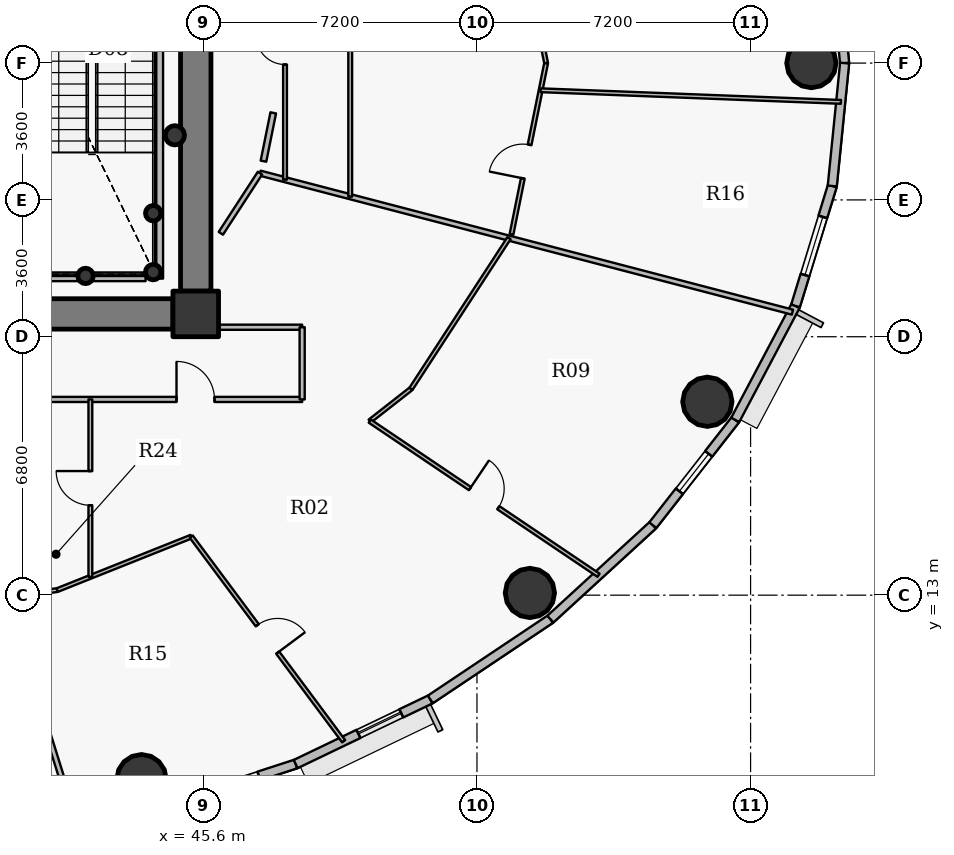
"""IFC4 building model, lengths in metres.
Left out: names, types, materials, properties, quantities, classifications, styles, units other than length and angle.
Written with IfcOpenShell. Run it as: python <this file> out.ifc"""

import sys

from ifc_helpers import new_model, si_unit, direction, frame, frame_2d, origin, origin_2d, place, context, subcontext, project, spatial, rectangle, hollow_circle, extrude, source, transform, mapped, element, fill, save


model = new_model("IFC4")
c1 = context("Model", 3, precision=1e-05, world=origin(), true_north=direction((0.0, 1.0)))
c2 = subcontext(c1, "Body", "Model", "MODEL_VIEW")
j1 = project(units=[si_unit("LENGTHUNIT", "METRE"), si_unit("PLANEANGLEUNIT", "RADIAN")], contexts=[c1])
p1 = place(None, origin())
s1 = spatial("IfcSite", under=j1, at=p1, CompositionType="ELEMENT")
p2 = place(p1, origin())
s2 = spatial("IfcBuilding", under=s1, at=p2, CompositionType="ELEMENT")
p3 = place(p2, frame((0.0, 0.0, 178.65)))
s3 = spatial("IfcBuildingStorey", under=s2, at=p3, CompositionType="ELEMENT", Elevation=178.65)
p4 = place(p3, frame((45.4, 20.4, 0.0), z_axis=(0.0, 0.0, 1.0), x_axis=(1.0, 0.0, 0.0)))
e1 = element("IfcColumn", 1, at=p4, inside=s3, PredefinedType="COLUMN", context=c2, shape_type="SweptSolid", body=[
    extrude(rectangle(XDim=1.2, YDim=1.2, at=origin_2d()), origin(), (0.0, 0.0, 1.0), 3.75),
])
for number, where, z_axis, x_axis in (
    (2, (44.28, 21.5, 0.0), (0.0, 0.0, 1.0), (1.0, 0.0, 0.0)),
    (3, (44.28, 23.05, 0.0), (0.0, 0.0, 1.0), (1.0, 0.0, 0.0)),
    (4, (42.5, 21.4, 0.0), (0.0, 0.0, 1.0), (1.0, 0.0, 0.0)),
):
    element("IfcColumn", number, at=place(p3, frame(where, z_axis=z_axis, x_axis=x_axis)), inside=s3, PredefinedType="COLUMN", context=c2, shape_type="SweptSolid", body=[
        extrude(hollow_circle(Radius=0.203, WallThickness=0.016, at=origin_2d()), origin(), (0.0, 0.0, 1.0), 3.75),
    ])
p5 = place(p3, frame((45.4, 33.0, 0.0), z_axis=(0.0, 0.0, 1.0), x_axis=(0.0, -1.0, 0.0)))
e5 = element("IfcWall", 5, at=p5, inside=s3, PredefinedType="SHEAR", context=c2, shape_type="SweptSolid", body=[
    extrude(rectangle(XDim=12.0, YDim=0.8, at=frame_2d((6.0, 0.0))), origin(), (0.0, 0.0, 1.0), 2.95),
])
p6 = place(p3, frame((44.8, 20.4, 0.0), z_axis=(0.0, 0.0, 1.0), x_axis=(-1.0, 0.0, 0.0)))
e6 = element("IfcWall", 6, at=p6, inside=s3, PredefinedType="SHEAR", context=c2, shape_type="SweptSolid", body=[
    extrude(rectangle(XDim=17.6, YDim=0.8, at=frame_2d((8.8, 0.0))), origin(), (0.0, 0.0, 1.0), 2.95),
])
p7 = place(p6, frame((9.55, 0.0, 0.0)))
e7 = element("IfcOpeningElement", 7, at=p7, cuts=e6, PredefinedType="OPENING", context=c2, shape_type="SweptSolid", body=[
    extrude(rectangle(XDim=1.15, YDim=2.15, at=origin_2d()), frame((0.575, 0.41, 1.075), z_axis=(0.0, -1.0, 0.0), x_axis=(1.0, 0.0, 0.0)), (0.0, 0.0, 1.0), 0.82),
])
for number, where, z_axis, x_axis in (
    (8, (61.6, 27.0, 0.0), (0.0, 0.0, 1.0), (1.0, 0.0, 0.0)),
    (9, (43.973, 8.159, 0.0), (0.0, 0.0, 1.0), (1.0, 0.0, 0.0)),
    (10, (54.192, 13.058, 0.0), (0.0, 0.0, 1.0), (1.0, 0.0, 0.0)),
    (11, (58.863, 18.089, 0.0), (0.0, 0.0, 1.0), (1.0, 0.0, 0.0)),
):
    element("IfcColumn", number, at=place(p3, frame(where, z_axis=z_axis, x_axis=x_axis)), inside=s3, PredefinedType="COLUMN", context=c2, shape_type="SweptSolid", body=[
        extrude(hollow_circle(Radius=0.65, WallThickness=0.04, at=origin_2d()), origin(), (0.0, 0.0, 1.0), 3.75),
    ])
p8 = place(p3, frame((44.85, 25.1, 0.0), z_axis=(0.0, 0.0, 1.0), x_axis=(1.0, 0.0, 0.0)))
e12 = element("IfcColumn", 12, at=p8, inside=s3, PredefinedType="COLUMN", context=c2, shape_type="SweptSolid", body=[
    extrude(hollow_circle(Radius=0.254, WallThickness=0.02, at=origin_2d()), origin(), (0.0, 0.0, 1.0), 3.75),
])
p9 = place(p3, frame((62.15, 30.234, 0.0), z_axis=(0.0, 0.0, 1.0), x_axis=(0.100061534614, -0.994981250723, 0.0)))
e13 = element("IfcWall", 13, at=p9, inside=s3, PredefinedType="SOLIDWALL", context=c2, shape_type="SweptSolid", body=[
    extrude(rectangle(XDim=3.25, YDim=0.24, at=frame_2d((1.625, 0.0))), origin(), (0.0, 0.0, 1.0), 3.5),
])
p10 = place(p3, frame((48.03, 8.556, 0.0), z_axis=(0.0, 0.0, 1.0), x_axis=(-0.951209870236, -0.30854462038, 0.0)))
e14 = element("IfcWall", 14, at=p10, inside=s3, PredefinedType="SOLIDWALL", context=c2, shape_type="SweptSolid", body=[
    extrude(rectangle(XDim=4.038, YDim=0.24, at=frame_2d((2.019, 0.0))), origin(), (0.0, 0.0, 1.0), 3.5),
])
p11 = place(p10, frame((1.019, 0.0, 0.9)))
e15 = element("IfcOpeningElement", 15, at=p11, cuts=e14, PredefinedType="OPENING", context=c2, shape_type="SweptSolid", body=[
    extrude(rectangle(XDim=2.0, YDim=1.75, at=origin_2d()), frame((1.0, 0.13, 0.875), z_axis=(0.0, -1.0, 0.0), x_axis=(1.0, 0.0, 0.0)), (0.0, 0.0, 1.0), 0.26),
])
p12 = place(p3, frame((51.573, 10.257, 0.0), z_axis=(0.0, 0.0, 1.0), x_axis=(-0.901564733809, -0.432644231155, 0.0)))
e16 = element("IfcWall", 16, at=p12, inside=s3, PredefinedType="SOLIDWALL", context=c2, shape_type="SweptSolid", body=[
    extrude(rectangle(XDim=3.93, YDim=0.24, at=frame_2d((1.965, 0.0))), origin(), (0.0, 0.0, 1.0), 3.5),
])
p13 = place(p12, frame((0.848, 0.0, 0.9)))
e17 = element("IfcOpeningElement", 17, at=p13, cuts=e16, PredefinedType="OPENING", context=c2, shape_type="SweptSolid", body=[
    extrude(rectangle(XDim=1.25, YDim=1.65, at=origin_2d()), frame((0.625, 0.13, 0.825), z_axis=(0.0, -1.0, 0.0), x_axis=(1.0, 0.0, 0.0)), (0.0, 0.0, 1.0), 0.26),
])
p14 = place(p3, frame((54.732, 12.369, 0.0), z_axis=(0.0, 0.0, 1.0), x_axis=(-0.831228998277, -0.555930168657, 0.0)))
e18 = element("IfcWall", 18, at=p14, inside=s3, PredefinedType="SOLIDWALL", context=c2, shape_type="SweptSolid", body=[
    extrude(rectangle(XDim=3.8, YDim=0.24, at=frame_2d((1.9, 0.0))), origin(), (0.0, 0.0, 1.0), 3.5),
])
p15 = place(p3, frame((57.428, 14.842, 0.0), z_axis=(0.0, 0.0, 1.0), x_axis=(-0.737076565834, -0.675809245349, 0.0)))
e19 = element("IfcWall", 19, at=p15, inside=s3, PredefinedType="SOLIDWALL", context=c2, shape_type="SweptSolid", body=[
    extrude(rectangle(XDim=3.658, YDim=0.24, at=frame_2d((1.829, 0.0))), origin(), (0.0, 0.0, 1.0), 3.5),
])
p16 = place(p3, frame((59.596, 17.612, 0.0), z_axis=(0.0, 0.0, 1.0), x_axis=(-0.616287674549, -0.787521112224, 0.0)))
e20 = element("IfcWall", 20, at=p16, inside=s3, PredefinedType="SOLIDWALL", context=c2, shape_type="SweptSolid", body=[
    extrude(rectangle(XDim=3.517, YDim=0.24, at=frame_2d((1.759, 0.0))), origin(), (0.0, 0.0, 1.0), 3.5),
])
p17 = place(p16, frame((1.134, 0.0, 0.9)))
e21 = element("IfcOpeningElement", 21, at=p17, cuts=e20, PredefinedType="OPENING", context=c2, shape_type="SweptSolid", body=[
    extrude(rectangle(XDim=1.25, YDim=1.65, at=origin_2d()), frame((0.625, 0.13, 0.825), z_axis=(0.0, -1.0, 0.0), x_axis=(1.0, 0.0, 0.0)), (0.0, 0.0, 1.0), 0.26),
])
p18 = place(p3, frame((61.183, 20.611, 0.0), z_axis=(0.0, 0.0, 1.0), x_axis=(-0.467586874938, -0.88394712194, 0.0)))
e22 = element("IfcWall", 22, at=p18, inside=s3, PredefinedType="SOLIDWALL", context=c2, shape_type="SweptSolid", body=[
    extrude(rectangle(XDim=3.393, YDim=0.24, at=frame_2d((1.697, 0.0))), origin(), (0.0, 0.0, 1.0), 3.5),
])
p19 = place(p3, frame((62.15, 23.766, 0.0), z_axis=(0.0, 0.0, 1.0), x_axis=(-0.293097995113, -0.956082405058, 0.0)))
e23 = element("IfcWall", 23, at=p19, inside=s3, PredefinedType="SOLIDWALL", context=c2, shape_type="SweptSolid", body=[
    extrude(rectangle(XDim=3.3, YDim=0.24, at=frame_2d((1.65, 0.0))), origin(), (0.0, 0.0, 1.0), 3.5),
])
p20 = place(p19, frame((0.85, 0.0, 0.9)))
e24 = element("IfcOpeningElement", 24, at=p20, cuts=e23, PredefinedType="OPENING", context=c2, shape_type="SweptSolid", body=[
    extrude(rectangle(XDim=1.6, YDim=1.75, at=origin_2d()), frame((0.8, 0.13, 0.875), z_axis=(0.0, -1.0, 0.0), x_axis=(1.0, 0.0, 0.0)), (0.0, 0.0, 1.0), 0.26),
])
p21 = place(p3, frame((62.475, 27.0, 0.0), z_axis=(0.0, 0.0, 1.0), x_axis=(-0.100061534614, -0.994981250723, 0.0)))
e25 = element("IfcWall", 25, at=p21, inside=s3, PredefinedType="SOLIDWALL", context=c2, shape_type="SweptSolid", body=[
    extrude(rectangle(XDim=3.25, YDim=0.24, at=frame_2d((1.625, 0.0))), origin(), (0.0, 0.0, 1.0), 3.5),
])
p22 = place(p3, frame((36.0, 12.419, 0.0), z_axis=(0.0, 0.0, 1.0), x_axis=(0.992396615981, 0.123081097612, 0.0)))
e26 = element("IfcWall", 26, at=p22, inside=s3, PredefinedType="PARTITIONING", context=c2, shape_type="SweptSolid", body=[
    extrude(rectangle(XDim=5.798, YDim=0.1, at=frame_2d((2.899, 0.0))), origin(), (0.0, 0.0, 1.0), 2.935),
])
p23 = place(p3, frame((38.764, 18.15, 0.0), z_axis=(0.0, 0.0, 1.0), x_axis=(0.298084348379, -0.954539533624, 0.0)))
e27 = element("IfcWall", 27, at=p23, inside=s3, PredefinedType="PARTITIONING", context=c2, shape_type="SweptSolid", body=[
    extrude(rectangle(XDim=11.74, YDim=0.135, at=frame_2d((5.87, 0.0))), origin(), (0.0, 0.0, 1.0), 2.935),
])
p24 = place(p3, frame((38.764, 18.15, 0.0), z_axis=(0.0, 0.0, 1.0), x_axis=(1.0, 0.0, 0.0)))
e28 = element("IfcWall", 28, at=p24, inside=s3, PredefinedType="PARTITIONING", context=c2, shape_type="SweptSolid", body=[
    extrude(rectangle(XDim=9.436, YDim=0.135, at=frame_2d((4.718, 0.0))), origin(), (0.0, 0.0, 1.0), 2.935),
])
p25 = place(p24, frame((6.13, 0.0, 0.0)))
e29 = element("IfcOpeningElement", 29, at=p25, cuts=e28, PredefinedType="OPENING", context=c2, shape_type="SweptSolid", body=[
    extrude(rectangle(XDim=1.0, YDim=2.15, at=origin_2d()), frame((0.5, 0.078, 1.075), z_axis=(0.0, -1.0, 0.0), x_axis=(1.0, 0.0, 0.0)), (0.0, 0.0, 1.0), 0.155),
])
p26 = place(p3, frame((41.754, 13.133, 0.0), z_axis=(0.0, 0.0, 1.0), x_axis=(0.928786664236, 0.370614803182, 0.0)))
e30 = element("IfcWall", 30, at=p26, inside=s3, PredefinedType="PARTITIONING", context=c2, shape_type="SweptSolid", body=[
    extrude(rectangle(XDim=3.798, YDim=0.1, at=frame_2d((1.899, 0.0))), origin(), (0.0, 0.0, 1.0), 2.935),
])
p27 = place(p3, frame((42.627, 13.481, 0.0), z_axis=(0.0, 0.0, 1.0), x_axis=(0.0, 1.0, 0.0)))
e31 = element("IfcWall", 31, at=p27, inside=s3, PredefinedType="PARTITIONING", context=c2, shape_type="SweptSolid", body=[
    extrude(rectangle(XDim=4.669, YDim=0.1, at=frame_2d((2.334, 0.0))), origin(), (0.0, 0.0, 1.0), 3.5),
])
p28 = place(p27, frame((1.885, 0.0, 0.0)))
e32 = element("IfcOpeningElement", 32, at=p28, cuts=e31, PredefinedType="OPENING", context=c2, shape_type="SweptSolid", body=[
    extrude(rectangle(XDim=0.9, YDim=2.1, at=origin_2d()), frame((0.45, 0.06, 1.05), z_axis=(0.0, -1.0, 0.0), x_axis=(1.0, 0.0, 0.0)), (0.0, 0.0, 1.0), 0.12),
])
p29 = place(p3, frame((44.44, 21.33, 0.0), z_axis=(0.0, 0.0, 1.0), x_axis=(0.0, 1.0, 0.0)))
e33 = element("IfcWall", 33, at=p29, inside=s3, PredefinedType="PARTITIONING", context=c2, shape_type="SweptSolid", body=[
    extrude(rectangle(XDim=8.52, YDim=0.2, at=frame_2d((4.26, 0.0))), origin(), (0.0, 0.0, 1.0), 3.5),
])
p30 = place(p3, frame((45.282, 14.54, 0.0), z_axis=(0.0, 0.0, 1.0), x_axis=(0.597407497301, -0.801937829366, 0.0)))
e34 = element("IfcWall", 34, at=p30, inside=s3, PredefinedType="PARTITIONING", context=c2, shape_type="SweptSolid", body=[
    extrude(rectangle(XDim=6.713, YDim=0.1, at=frame_2d((3.356, 0.0))), origin(), (0.0, 0.0, 1.0), 2.935),
])
p31 = place(p30, frame((2.906, 0.0, 0.0)))
e35 = element("IfcOpeningElement", 35, at=p31, cuts=e34, PredefinedType="OPENING", context=c2, shape_type="SweptSolid", body=[
    extrude(rectangle(XDim=0.9, YDim=2.1, at=origin_2d()), frame((0.45, 0.06, 1.05), z_axis=(0.0, -1.0, 0.0), x_axis=(1.0, 0.0, 0.0)), (0.0, 0.0, 1.0), 0.12),
])
p32 = place(p3, frame((45.8, 20.05, 0.0), z_axis=(0.0, 0.0, 1.0), x_axis=(1.0, 0.0, 0.0)))
e36 = element("IfcWall", 36, at=p32, inside=s3, PredefinedType="PARTITIONING", context=c2, shape_type="SweptSolid", body=[
    extrude(rectangle(XDim=2.4, YDim=0.135, at=frame_2d((1.2, 0.0))), origin(), (0.0, 0.0, 1.0), 3.5),
])
p33 = place(p3, frame((47.09, 24.105, 0.0), z_axis=(0.0, 0.0, 1.0), x_axis=(0.967573213792, -0.252590728159, 0.0)))
e37 = element("IfcWall", 37, at=p33, inside=s3, PredefinedType="PARTITIONING", context=c2, shape_type="SweptSolid", body=[
    extrude(rectangle(XDim=14.481, YDim=0.135, at=frame_2d((7.24, 0.0))), origin(), (0.0, 0.0, 1.0), 2.935),
])
p34 = place(p3, frame((47.749, 23.933, 0.0), z_axis=(0.0, 0.0, 1.0), x_axis=(0.0, 1.0, 0.0)))
e38 = element("IfcWall", 38, at=p34, inside=s3, PredefinedType="PARTITIONING", context=c2, shape_type="SweptSolid", body=[
    extrude(rectangle(XDim=9.314, YDim=0.1, at=frame_2d((4.657, 0.0))), origin(), (0.0, 0.0, 1.0), 2.935),
])
p35 = place(p34, frame((3.03, 0.0, 0.0)))
e39 = element("IfcOpeningElement", 39, at=p35, cuts=e38, PredefinedType="OPENING", context=c2, shape_type="SweptSolid", body=[
    extrude(rectangle(XDim=0.76, YDim=2.1, at=origin_2d()), frame((0.38, 0.06, 1.05), z_axis=(0.0, -1.0, 0.0), x_axis=(1.0, 0.0, 0.0)), (0.0, 0.0, 1.0), 0.12),
])
p36 = place(p3, frame((48.2, 18.15, 0.0), z_axis=(0.0, 0.0, 1.0), x_axis=(0.0, 1.0, 0.0)))
e40 = element("IfcWall", 40, at=p36, inside=s3, PredefinedType="PARTITIONING", context=c2, shape_type="SweptSolid", body=[
    extrude(rectangle(XDim=1.9, YDim=0.135, at=frame_2d((0.95, 0.0))), origin(), (0.0, 0.0, 1.0), 3.5),
])
p37 = place(p3, frame((49.464, 23.485, 0.0), z_axis=(0.0, 0.0, 1.0), x_axis=(0.0, 1.0, 0.0)))
e41 = element("IfcWall", 41, at=p37, inside=s3, PredefinedType="PARTITIONING", context=c2, shape_type="SweptSolid", body=[
    extrude(rectangle(XDim=10.465, YDim=0.1, at=frame_2d((5.232, 0.0))), origin(), (0.0, 0.0, 1.0), 2.935),
])
p38 = place(p37, frame((4.783, 0.0, 0.0)))
e42 = element("IfcOpeningElement", 42, at=p38, cuts=e41, PredefinedType="OPENING", context=c2, shape_type="SweptSolid", body=[
    extrude(rectangle(XDim=0.9, YDim=2.1, at=origin_2d()), frame((0.45, 0.06, 1.05), z_axis=(0.0, -1.0, 0.0), x_axis=(1.0, 0.0, 0.0)), (0.0, 0.0, 1.0), 0.12),
])
p39 = place(p3, frame((49.979, 17.58, 0.0), z_axis=(0.0, 0.0, 1.0), x_axis=(0.787344176355, 0.6165137046, 0.0)))
e43 = element("IfcWall", 43, at=p39, inside=s3, PredefinedType="PARTITIONING", context=c2, shape_type="SweptSolid", body=[
    extrude(rectangle(XDim=1.378, YDim=0.1, at=frame_2d((0.689, 0.0))), origin(), (0.0, 0.0, 1.0), 3.5),
])
p40 = place(p3, frame((49.979, 17.58, 0.0), z_axis=(0.0, 0.0, 1.0), x_axis=(0.829313188428, -0.55878406876, 0.0)))
e44 = element("IfcWall", 44, at=p40, inside=s3, PredefinedType="PARTITIONING", context=c2, shape_type="SweptSolid", body=[
    extrude(rectangle(XDim=7.259, YDim=0.1, at=frame_2d((3.629, 0.0))), origin(), (0.0, 0.0, 1.0), 2.935),
])
p41 = place(p40, frame((3.179, 0.0, 0.0)))
e45 = element("IfcOpeningElement", 45, at=p41, cuts=e44, PredefinedType="OPENING", context=c2, shape_type="SweptSolid", body=[
    extrude(rectangle(XDim=0.9, YDim=2.1, at=origin_2d()), frame((0.45, 0.06, 1.05), z_axis=(0.0, -1.0, 0.0), x_axis=(1.0, 0.0, 0.0)), (0.0, 0.0, 1.0), 0.12),
])
p42 = place(p3, frame((51.064, 18.429, 0.0), z_axis=(0.0, 0.0, 1.0), x_axis=(0.545362062942, 0.838200584767, 0.0)))
e46 = element("IfcWall", 46, at=p42, inside=s3, PredefinedType="PARTITIONING", context=c2, shape_type="SweptSolid", body=[
    extrude(rectangle(XDim=4.729, YDim=0.1, at=frame_2d((2.365, 0.0))), origin(), (0.0, 0.0, 1.0), 2.935),
])
p43 = place(p3, frame((53.709, 22.494, 0.0), z_axis=(0.0, 0.0, 1.0), x_axis=(0.198239863178, 0.980153537282, 0.0)))
e47 = element("IfcWall", 47, at=p43, inside=s3, PredefinedType="PARTITIONING", context=c2, shape_type="SweptSolid", body=[
    extrude(rectangle(XDim=4.597, YDim=0.1, at=frame_2d((2.299, 0.0))), origin(), (0.0, 0.0, 1.0), 2.935),
])
p44 = place(p43, frame((1.504, 0.0, 0.0)))
e48 = element("IfcOpeningElement", 48, at=p44, cuts=e47, PredefinedType="OPENING", context=c2, shape_type="SweptSolid", body=[
    extrude(rectangle(XDim=0.9, YDim=2.1, at=origin_2d()), frame((0.45, 0.06, 1.05), z_axis=(0.0, -1.0, 0.0), x_axis=(1.0, 0.0, 0.0)), (0.0, 0.0, 1.0), 0.12),
])
p45 = place(p3, frame((54.189, 29.132, 0.0), z_axis=(0.0, 0.0, 1.0), x_axis=(0.198252946245, -0.98015089109, 0.0)))
e49 = element("IfcWall", 49, at=p45, inside=s3, PredefinedType="PARTITIONING", context=c2, shape_type="SweptSolid", body=[
    extrude(rectangle(XDim=2.175, YDim=0.1, at=frame_2d((1.087, 0.0))), origin(), (0.0, 0.0, 1.0), 2.935),
])
p46 = place(p3, frame((54.475, 26.285, 0.0), z_axis=(0.0, 0.0, 1.0), x_axis=(0.999251521297, -0.03868329336, 0.0)))
e50 = element("IfcWall", 50, at=p46, inside=s3, PredefinedType="PARTITIONING", context=c2, shape_type="SweptSolid", body=[
    extrude(rectangle(XDim=7.908, YDim=0.1, at=frame_2d((3.954, 0.0))), origin(), (0.0, 0.0, 1.0), 2.935),
])
p47 = place(p3, frame((44.08, 21.33, 0.0), z_axis=(0.0, 0.0, 1.0), x_axis=(-1.0, 0.0, 0.0)))
e51 = element("IfcWall", 51, at=p47, inside=s3, PredefinedType="PARTITIONING", context=c2, shape_type="SweptSolid", body=[
    extrude(rectangle(XDim=2.82, YDim=0.135, at=frame_2d((1.41, 0.0))), origin(), (0.0, 0.0, 1.0), 3.035),
])
p48 = place(p3, frame((44.81, 20.0, 0.0), z_axis=(0.0, 0.0, 1.0), x_axis=(1.0, 0.0, 0.0)))
e52 = element("IfcWall", 52, at=p48, inside=s3, PredefinedType="PARTITIONING", context=c2, shape_type="SweptSolid", body=[
    extrude(rectangle(XDim=0.98, YDim=0.135, at=frame_2d((0.49, 0.0))), origin(), (0.0, 0.0, 1.0), 2.935),
])
p49 = place(p3, frame((45.8, 20.377, 0.0), z_axis=(0.0, 0.0, 1.0), x_axis=(0.0, 1.0, 0.0)))
e53 = element("IfcWall", 53, at=p49, inside=s3, PredefinedType="PARTITIONING", context=c2, shape_type="SweptSolid", body=[
    extrude(rectangle(XDim=0.613, YDim=0.135, at=frame_2d((0.306, 0.0))), origin(), (0.0, 0.0, 1.0), 3.5),
])
p50 = place(p3, frame((46.06, 22.521, 0.0), z_axis=(0.0, 0.0, 1.0), x_axis=(0.545329049498, 0.838222063521, 0.0)))
e54 = element("IfcWall", 54, at=p50, inside=s3, PredefinedType="PARTITIONING", context=c2, shape_type="SweptSolid", body=[
    extrude(rectangle(XDim=1.889, YDim=0.135, at=frame_2d((0.944, 0.0))), origin(), (0.0, 0.0, 1.0), 2.935),
])
p51 = place(p3, frame((47.182, 24.419, 0.0), z_axis=(0.0, 0.0, 1.0), x_axis=(0.198178705385, 0.980165904698, 0.0)))
e55 = element("IfcWall", 55, at=p51, inside=s3, PredefinedType="PARTITIONING", context=c2, shape_type="SweptSolid", body=[
    extrude(rectangle(XDim=1.297, YDim=0.15, at=frame_2d((0.648, 0.0))), origin(), (0.0, 0.0, 1.0), 3.5),
])
m1 = source(origin(), c2, "Body", "SweptSolid", [
    extrude(rectangle(XDim=2.0, YDim=1.75, at=origin_2d()), frame((1.0, 0.03, 0.875), z_axis=(0.0, -1.0, 0.0), x_axis=(1.0, 0.0, 0.0)), (0.0, 0.0, 1.0), 0.06),
])
p52 = place(p11, origin())
e56 = element("IfcWindow", 56, at=p52, inside=s3, PartitioningType="DOUBLE_PANEL_VERTICAL", PredefinedType="WINDOW", context=c2, shape_type="MappedRepresentation", body=[
    mapped(m1, transform((0.0, 0.0, 0.0), x_axis=(1.0, 0.0, 0.0), y_axis=(0.0, 1.0, 0.0), z_axis=(0.0, 0.0, 1.0), scale=1.0)),
])
fill(e15, e56)
m2 = source(origin(), c2, "Body", "SweptSolid", [
    extrude(rectangle(XDim=1.25, YDim=1.65, at=origin_2d()), frame((0.625, 0.03, 0.825), z_axis=(0.0, -1.0, 0.0), x_axis=(1.0, 0.0, 0.0)), (0.0, 0.0, 1.0), 0.06),
])
p53 = place(p13, origin())
e57 = element("IfcWindow", 57, at=p53, inside=s3, PartitioningType="SINGLE_PANEL", PredefinedType="WINDOW", context=c2, shape_type="MappedRepresentation", body=[
    mapped(m2, transform((0.0, 0.0, 0.0), x_axis=(1.0, 0.0, 0.0), y_axis=(0.0, 1.0, 0.0), z_axis=(0.0, 0.0, 1.0), scale=1.0)),
])
fill(e17, e57)
m3 = source(origin(), c2, "Body", "SweptSolid", [
    extrude(rectangle(XDim=1.6, YDim=1.75, at=origin_2d()), frame((0.8, 0.03, 0.875), z_axis=(0.0, -1.0, 0.0), x_axis=(1.0, 0.0, 0.0)), (0.0, 0.0, 1.0), 0.06),
])
p54 = place(p20, origin())
e58 = element("IfcWindow", 58, at=p54, inside=s3, PartitioningType="DOUBLE_PANEL_VERTICAL", PredefinedType="WINDOW", context=c2, shape_type="MappedRepresentation", body=[
    mapped(m3, transform((0.0, 0.0, 0.0), x_axis=(1.0, 0.0, 0.0), y_axis=(0.0, 1.0, 0.0), z_axis=(0.0, 0.0, 1.0), scale=1.0)),
])
fill(e24, e58)
p55 = place(p17, origin())
e59 = element("IfcWindow", 59, at=p55, inside=s3, PartitioningType="SINGLE_PANEL", PredefinedType="WINDOW", context=c2, shape_type="MappedRepresentation", body=[
    mapped(m2, transform((0.0, 0.0, 0.0), x_axis=(1.0, 0.0, 0.0), y_axis=(0.0, 1.0, 0.0), z_axis=(0.0, 0.0, 1.0), scale=1.0)),
])
fill(e21, e59)
m4 = source(origin(), c2, "Body", "SweptSolid", [
    extrude(rectangle(XDim=1.0, YDim=2.15, at=origin_2d()), frame((0.5, 0.025, 1.075), z_axis=(0.0, -1.0, 0.0), x_axis=(1.0, 0.0, 0.0)), (0.0, 0.0, 1.0), 0.05),
])
p56 = place(p25, origin())
e60 = element("IfcDoor", 60, at=p56, inside=s3, OperationType="SINGLE_SWING_LEFT", PredefinedType="DOOR", context=c2, shape_type="MappedRepresentation", body=[
    mapped(m4, transform((0.0, 0.0, 0.0), x_axis=(1.0, 0.0, 0.0), y_axis=(0.0, 1.0, 0.0), z_axis=(0.0, 0.0, 1.0), scale=1.0)),
])
fill(e29, e60)
m5 = source(origin(), c2, "Body", "SweptSolid", [
    extrude(rectangle(XDim=0.9, YDim=2.1, at=origin_2d()), frame((0.45, 0.025, 1.05), z_axis=(0.0, -1.0, 0.0), x_axis=(1.0, 0.0, 0.0)), (0.0, 0.0, 1.0), 0.05),
])
p57 = place(p31, origin())
e61 = element("IfcDoor", 61, at=p57, inside=s3, OperationType="SINGLE_SWING_RIGHT", PredefinedType="DOOR", context=c2, shape_type="MappedRepresentation", body=[
    mapped(m5, transform((0.0, 0.0, 0.0), x_axis=(1.0, 0.0, 0.0), y_axis=(0.0, 1.0, 0.0), z_axis=(0.0, 0.0, 1.0), scale=1.0)),
])
fill(e35, e61)
p58 = place(p41, origin())
e62 = element("IfcDoor", 62, at=p58, inside=s3, OperationType="SINGLE_SWING_LEFT", PredefinedType="DOOR", context=c2, shape_type="MappedRepresentation", body=[
    mapped(m5, transform((0.0, 0.0, 0.0), x_axis=(1.0, 0.0, 0.0), y_axis=(0.0, 1.0, 0.0), z_axis=(0.0, 0.0, 1.0), scale=1.0)),
])
fill(e45, e62)
p59 = place(p28, origin())
e63 = element("IfcDoor", 63, at=p59, inside=s3, OperationType="SINGLE_SWING_RIGHT", PredefinedType="DOOR", context=c2, shape_type="MappedRepresentation", body=[
    mapped(m5, transform((0.0, 0.0, 0.0), x_axis=(1.0, 0.0, 0.0), y_axis=(0.0, 1.0, 0.0), z_axis=(0.0, 0.0, 1.0), scale=1.0)),
])
fill(e32, e63)
p60 = place(p44, origin())
e64 = element("IfcDoor", 64, at=p60, inside=s3, OperationType="SINGLE_SWING_LEFT", PredefinedType="DOOR", context=c2, shape_type="MappedRepresentation", body=[
    mapped(m5, transform((0.0, 0.0, 0.0), x_axis=(1.0, 0.0, 0.0), y_axis=(0.0, 1.0, 0.0), z_axis=(0.0, 0.0, 1.0), scale=1.0)),
])
fill(e48, e64)
m6 = source(origin(), c2, "Body", "SweptSolid", [
    extrude(rectangle(XDim=0.76, YDim=2.1, at=origin_2d()), frame((0.38, 0.025, 1.05), z_axis=(0.0, -1.0, 0.0), x_axis=(1.0, 0.0, 0.0)), (0.0, 0.0, 1.0), 0.05),
])
p61 = place(p35, origin())
e65 = element("IfcDoor", 65, at=p61, inside=s3, OperationType="SINGLE_SWING_RIGHT", PredefinedType="DOOR", context=c2, shape_type="MappedRepresentation", body=[
    mapped(m6, transform((0.0, 0.0, 0.0), x_axis=(1.0, 0.0, 0.0), y_axis=(0.0, 1.0, 0.0), z_axis=(0.0, 0.0, 1.0), scale=1.0)),
])
fill(e39, e65)
save(model, sys.argv[1])
